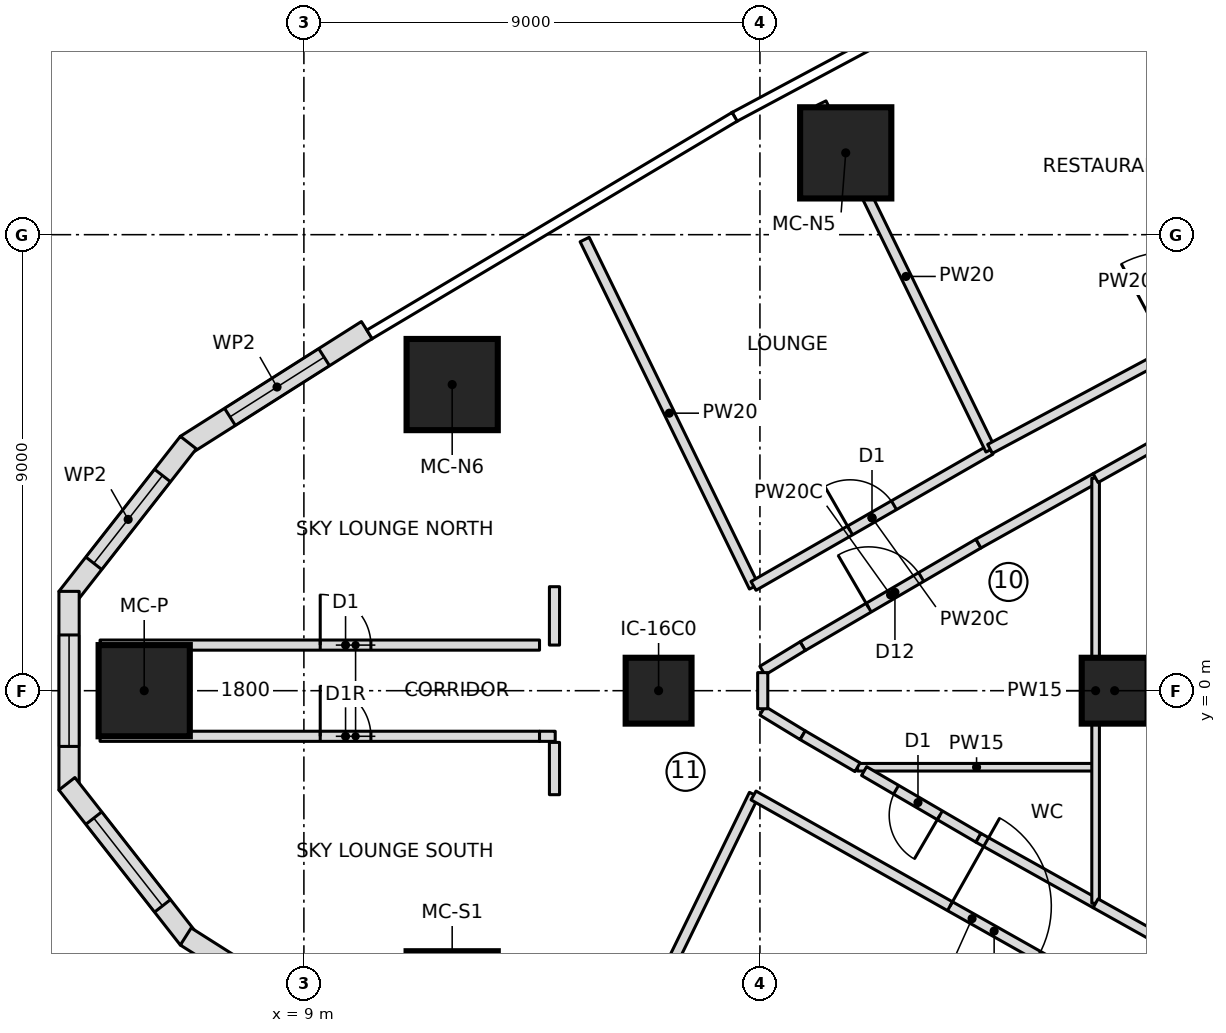
"""IFC4 building model, lengths in metres.
Left out: names, types, materials, properties, quantities, classifications, styles, units other than length and angle.
Written with IfcOpenShell. Run it as: python <this file> out.ifc"""

import sys

from ifc_helpers import new_model, si_unit, direction, frame, frame_2d, origin, origin_2d, place, context, subcontext, project, spatial, polyline, rectangle, outline, extrude, element, fill, save


model = new_model("IFC4")
c1 = context("Model", 3, precision=1e-05, world=origin(), true_north=direction((0.0, 1.0)))
c2 = subcontext(c1, "Body", "Model", "MODEL_VIEW")
j1 = project(units=[si_unit("LENGTHUNIT", "METRE"), si_unit("PLANEANGLEUNIT", "RADIAN")], contexts=[c1])
p1 = place(None, origin())
s1 = spatial("IfcSite", under=j1, at=p1, CompositionType="ELEMENT")
p2 = place(p1, origin())
s2 = spatial("IfcBuilding", under=s1, at=p2, CompositionType="ELEMENT")
p3 = place(p2, frame((0.0, 0.0, 35.0)))
s3 = spatial("IfcBuildingStorey", under=s2, at=p3, CompositionType="ELEMENT", Elevation=35.0)
for number, where, z_axis, x_axis in (
    (1, (5.848, 0.0, 0.0), (0.0, 0.0, 1.0), (1.0, 0.0, 0.0)),
    (2, (11.927, -6.042, 0.0), (0.0, 0.0, 1.0), (1.0, 0.0, 0.0)),
    (3, (19.693, 10.615, 0.0), (0.0, 0.0, 1.0), (1.0, 0.0, 0.0)),
    (4, (11.927, 6.042, 0.0), (0.0, 0.0, 1.0), (1.0, 0.0, 0.0)),
):
    element("IfcColumn", number, at=place(p3, frame(where, z_axis=z_axis, x_axis=x_axis)), inside=s3, PredefinedType="COLUMN", context=c2, shape_type="SweptSolid", body=[
        extrude(rectangle(XDim=1.8, YDim=1.8, at=origin_2d()), origin(), (0.0, 0.0, 1.0), 4.6),
    ])
for number, where, z_axis, x_axis in (
    (5, (16.0, 0.0, 0.0), (0.0, 0.0, 1.0), (1.0, 0.0, 0.0)),
    (6, (25.0, 0.0, 0.0), (0.0, 0.0, 1.0), (1.0, 0.0, 0.0)),
):
    element("IfcColumn", number, at=place(p3, frame(where, z_axis=z_axis, x_axis=x_axis)), inside=s3, PredefinedType="COLUMN", context=c2, shape_type="SweptSolid", body=[
        extrude(rectangle(XDim=1.3, YDim=1.3, at=origin_2d()), origin(), (0.0, 0.0, 1.0), 4.6),
    ])
p4 = place(p3, frame((10.242, 7.116, 0.0), z_axis=(0.0, 0.0, 1.0), x_axis=(-0.844551578623, -0.535474211372, 0.0)))
e7 = element("IfcWall", 7, at=p4, inside=s3, PredefinedType="NOTDEFINED", context=c2, shape_type="SweptSolid", body=[
    extrude(outline(polyline([(0.0, -0.2), (4.23, -0.2), (4.162, 0.2), (0.0, 0.2), (0.0, -0.2)])), origin(), (0.0, 0.0, 1.0), 4.3),
])
p5 = place(p4, frame((0.998, 0.0, 0.6)))
e8 = element("IfcOpeningElement", 8, at=p5, cuts=e7, PredefinedType="OPENING", context=c2, shape_type="SweptSolid", body=[
    extrude(outline(polyline([(0.0, 1.35), (0.084, 1.771), (0.322, 2.128), (0.679, 2.366), (1.1, 2.45), (1.521, 2.366), (1.878, 2.128), (2.116, 1.771), (2.2, 1.35), (2.2, 1.1), (2.116, 0.679), (1.878, 0.322), (1.521, 0.084), (1.1, 0.0), (0.679, 0.084), (0.322, 0.322), (0.084, 0.679), (0.0, 1.1), (0.0, 1.35)])), frame((0.0, 0.21, 0.0), z_axis=(0.0, -1.0, 0.0), x_axis=(1.0, 0.0, 0.0)), (0.0, 0.0, 1.0), 0.42),
])
p6 = place(p3, frame((6.698, 4.87, 0.0), z_axis=(0.0, 0.0, 1.0), x_axis=(-0.616586647779, -0.787287054245, 0.0)))
e9 = element("IfcWall", 9, at=p6, inside=s3, PredefinedType="NOTDEFINED", context=c2, shape_type="SweptSolid", body=[
    extrude(outline(polyline([(-0.034, -0.2), (3.852, -0.2), (3.714, 0.2), (0.034, 0.2), (-0.034, -0.2)])), origin(), (0.0, 0.0, 1.0), 4.3),
])
p7 = place(p6, frame((0.792, 0.0, 0.6)))
e10 = element("IfcOpeningElement", 10, at=p7, cuts=e9, PredefinedType="OPENING", context=c2, shape_type="SweptSolid", body=[
    extrude(outline(polyline([(0.0, 1.35), (0.084, 1.771), (0.322, 2.128), (0.679, 2.366), (1.1, 2.45), (1.521, 2.366), (1.878, 2.128), (2.116, 1.771), (2.2, 1.35), (2.2, 1.1), (2.116, 0.679), (1.878, 0.322), (1.521, 0.084), (1.1, 0.0), (0.679, 0.084), (0.322, 0.322), (0.084, 0.679), (0.0, 1.1), (0.0, 1.35)])), frame((0.0, 0.21, 0.0), z_axis=(0.0, -1.0, 0.0), x_axis=(1.0, 0.0, 0.0)), (0.0, 0.0, 1.0), 0.42),
])
p8 = place(p3, frame((4.365, 1.891, 0.0), z_axis=(0.0, 0.0, 1.0), x_axis=(0.0, -1.0, 0.0)))
e11 = element("IfcWall", 11, at=p8, inside=s3, PredefinedType="NOTDEFINED", context=c2, shape_type="SweptSolid", body=[
    extrude(outline(polyline([(-0.069, -0.2), (3.852, -0.2), (3.714, 0.2), (0.069, 0.2), (-0.069, -0.2)])), origin(), (0.0, 0.0, 1.0), 4.3),
])
p9 = place(p8, frame((0.792, 0.0, 0.6)))
e12 = element("IfcOpeningElement", 12, at=p9, cuts=e11, PredefinedType="OPENING", context=c2, shape_type="SweptSolid", body=[
    extrude(outline(polyline([(0.0, 1.35), (0.084, 1.771), (0.322, 2.128), (0.679, 2.366), (1.1, 2.45), (1.521, 2.366), (1.878, 2.128), (2.116, 1.771), (2.2, 1.35), (2.2, 1.1), (2.116, 0.679), (1.878, 0.322), (1.521, 0.084), (1.1, 0.0), (0.679, 0.084), (0.322, 0.322), (0.084, 0.679), (0.0, 1.1), (0.0, 1.35)])), frame((0.0, 0.21, 0.0), z_axis=(0.0, -1.0, 0.0), x_axis=(1.0, 0.0, 0.0)), (0.0, 0.0, 1.0), 0.42),
])
p10 = place(p3, frame((4.365, -1.891, 0.0), z_axis=(0.0, 0.0, 1.0), x_axis=(0.616586647779, -0.787287054245, 0.0)))
e13 = element("IfcWall", 13, at=p10, inside=s3, PredefinedType="NOTDEFINED", context=c2, shape_type="SweptSolid", body=[
    extrude(outline(polyline([(-0.069, -0.2), (3.817, -0.2), (3.749, 0.2), (0.069, 0.2), (-0.069, -0.2)])), origin(), (0.0, 0.0, 1.0), 4.3),
])
p11 = place(p10, frame((0.792, 0.0, 0.6)))
e14 = element("IfcOpeningElement", 14, at=p11, cuts=e13, PredefinedType="OPENING", context=c2, shape_type="SweptSolid", body=[
    extrude(outline(polyline([(0.0, 1.35), (0.084, 1.771), (0.322, 2.128), (0.679, 2.366), (1.1, 2.45), (1.521, 2.366), (1.878, 2.128), (2.116, 1.771), (2.2, 1.35), (2.2, 1.1), (2.116, 0.679), (1.878, 0.322), (1.521, 0.084), (1.1, 0.0), (0.679, 0.084), (0.322, 0.322), (0.084, 0.679), (0.0, 1.1), (0.0, 1.35)])), frame((0.0, 0.21, 0.0), z_axis=(0.0, -1.0, 0.0), x_axis=(1.0, 0.0, 0.0)), (0.0, 0.0, 1.0), 0.42),
])
p12 = place(p3, frame((6.698, -4.87, 0.0), z_axis=(0.0, 0.0, 1.0), x_axis=(0.844551578623, -0.535474211372, 0.0)))
e15 = element("IfcWall", 15, at=p12, inside=s3, PredefinedType="NOTDEFINED", context=c2, shape_type="SweptSolid", body=[
    extrude(outline(polyline([(-0.034, -0.2), (4.196, -0.2), (4.196, 0.2), (0.034, 0.2), (-0.034, -0.2)])), origin(), (0.0, 0.0, 1.0), 4.3),
])
p13 = place(p12, frame((0.998, 0.0, 0.6)))
e16 = element("IfcOpeningElement", 16, at=p13, cuts=e15, PredefinedType="OPENING", context=c2, shape_type="SweptSolid", body=[
    extrude(outline(polyline([(0.0, 1.35), (0.084, 1.771), (0.322, 2.128), (0.679, 2.366), (1.1, 2.45), (1.521, 2.366), (1.878, 2.128), (2.116, 1.771), (2.2, 1.35), (2.2, 1.1), (2.116, 0.679), (1.878, 0.322), (1.521, 0.084), (1.1, 0.0), (0.679, 0.084), (0.322, 0.322), (0.084, 0.679), (0.0, 1.1), (0.0, 1.35)])), frame((0.0, 0.21, 0.0), z_axis=(0.0, -1.0, 0.0), x_axis=(1.0, 0.0, 0.0)), (0.0, 0.0, 1.0), 0.42),
])
p14 = place(p3, frame((17.882, 2.05, 0.0), z_axis=(0.0, 0.0, 1.0), x_axis=(-0.438213564788, 0.898870887078, 0.0)))
e17 = element("IfcWall", 17, at=p14, inside=s3, PredefinedType="PARTITIONING", context=c2, shape_type="SweptSolid", body=[
    extrude(rectangle(XDim=7.625, YDim=0.2, at=frame_2d((3.813, 0.0))), origin(), (0.0, 0.0, 1.0), 4.3),
])
p15 = place(p3, frame((17.874, 2.068, 0.0), z_axis=(0.0, 0.0, 1.0), x_axis=(0.867093061484, 0.4981461861, 0.0)))
e18 = element("IfcWall", 18, at=p15, inside=s3, PredefinedType="PARTITIONING", context=c2, shape_type="SweptSolid", body=[
    extrude(rectangle(XDim=5.393, YDim=0.2, at=frame_2d((2.697, 0.0))), origin(), (0.0, 0.0, 1.0), 4.3),
])
p16 = place(p15, frame((2.197, 0.0, 0.0)))
e19 = element("IfcOpeningElement", 19, at=p16, cuts=e18, PredefinedType="OPENING", context=c2, shape_type="SweptSolid", body=[
    extrude(rectangle(XDim=1.0, YDim=2.1, at=frame_2d((0.5, 1.05))), frame((0.0, 0.11, 0.0), z_axis=(0.0, -1.0, 0.0), x_axis=(1.0, 0.0, 0.0)), (0.0, 0.0, 1.0), 0.22),
])
p17 = place(p3, frame((22.55, 4.755, 0.0), z_axis=(0.0, 0.0, 1.0), x_axis=(-0.438210669268, 0.898872298683, 0.0)))
e20 = element("IfcWall", 20, at=p17, inside=s3, PredefinedType="PARTITIONING", context=c2, shape_type="SweptSolid", body=[
    extrude(rectangle(XDim=7.612, YDim=0.2, at=frame_2d((3.806, 0.0))), origin(), (0.0, 0.0, 1.0), 4.3),
])
p18 = place(p3, frame((22.541, 4.773, 0.0), z_axis=(0.0, 0.0, 1.0), x_axis=(0.881864282024, 0.471503327762, 0.0)))
e21 = element("IfcWall", 21, at=p18, inside=s3, PredefinedType="PARTITIONING", context=c2, shape_type="SweptSolid", body=[
    extrude(rectangle(XDim=9.012, YDim=0.2, at=frame_2d((4.506, 0.0))), origin(), (0.0, 0.0, 1.0), 4.3),
])
p19 = place(p18, frame((4.006, 0.0, 0.0)))
e22 = element("IfcOpeningElement", 22, at=p19, cuts=e21, PredefinedType="OPENING", context=c2, shape_type="SweptSolid", body=[
    extrude(rectangle(XDim=2.0, YDim=2.4, at=frame_2d((1.0, 1.2))), frame((0.0, 0.11, 0.0), z_axis=(0.0, -1.0, 0.0), x_axis=(1.0, 0.0, 0.0)), (0.0, 0.0, 1.0), 0.22),
])
p20 = place(p3, frame((14.541, -8.904, 0.0), z_axis=(0.0, 0.0, 1.0), x_axis=(0.438213564788, 0.898870887078, 0.0)))
e23 = element("IfcWall", 23, at=p20, inside=s3, PredefinedType="PARTITIONING", context=c2, shape_type="SweptSolid", body=[
    extrude(rectangle(XDim=7.625, YDim=0.2, at=frame_2d((3.813, 0.0))), origin(), (0.0, 0.0, 1.0), 4.3),
])
p21 = place(p3, frame((17.874, -2.068, 0.0), z_axis=(0.0, 0.0, 1.0), x_axis=(0.871165632804, -0.490989246544, 0.0)))
e24 = element("IfcWall", 24, at=p21, inside=s3, PredefinedType="PARTITIONING", context=c2, shape_type="SweptSolid", body=[
    extrude(rectangle(XDim=9.901, YDim=0.2, at=frame_2d((4.951, 0.0))), origin(), (0.0, 0.0, 1.0), 4.3),
])
p22 = place(p21, frame((4.451, 0.0, 0.0)))
e25 = element("IfcOpeningElement", 25, at=p22, cuts=e24, PredefinedType="OPENING", context=c2, shape_type="SweptSolid", body=[
    extrude(rectangle(XDim=2.0, YDim=2.4, at=frame_2d((1.0, 1.2))), frame((0.0, 0.11, 0.0), z_axis=(0.0, -1.0, 0.0), x_axis=(1.0, 0.0, 0.0)), (0.0, 0.0, 1.0), 0.22),
])
p23 = place(p3, frame((19.926, -1.51, 0.0), z_axis=(0.0, 0.0, 1.0), x_axis=(1.0, 0.0, 0.0)))
e26 = element("IfcWall", 26, at=p23, inside=s3, PredefinedType="PARTITIONING", context=c2, shape_type="SweptSolid", body=[
    extrude(rectangle(XDim=4.699, YDim=0.15, at=frame_2d((2.349, 0.0))), origin(), (0.0, 0.0, 1.0), 4.3),
])
p24 = place(p3, frame((22.312, -2.903, 0.0), z_axis=(0.0, 0.0, 1.0), x_axis=(-0.863687380961, 0.504027884118, 0.0)))
e27 = element("IfcWall", 27, at=p24, inside=s3, PredefinedType="PARTITIONING", context=c2, shape_type="SweptSolid", body=[
    extrude(rectangle(XDim=2.613, YDim=0.2, at=frame_2d((1.306, 0.0))), origin(), (0.0, 0.0, 1.0), 4.3),
])
p25 = place(p24, frame((0.881, 0.0, 0.0)))
e28 = element("IfcOpeningElement", 28, at=p25, cuts=e27, PredefinedType="OPENING", context=c2, shape_type="SweptSolid", body=[
    extrude(rectangle(XDim=1.0, YDim=2.1, at=frame_2d((0.5, 1.05))), frame((0.0, 0.11, 0.0), z_axis=(0.0, -1.0, 0.0), x_axis=(1.0, 0.0, 0.0)), (0.0, 0.0, 1.0), 0.22),
])
p26 = place(p3, frame((24.625, -4.196, 0.0), z_axis=(0.0, 0.0, 1.0), x_axis=(-0.87283266248, 0.48801961365, 0.0)))
e29 = element("IfcWall", 29, at=p26, inside=s3, PredefinedType="PARTITIONING", context=c2, shape_type="SweptSolid", body=[
    extrude(rectangle(XDim=2.649, YDim=0.2, at=frame_2d((1.325, 0.0))), origin(), (0.0, 0.0, 1.0), 4.3),
])
p27 = place(p3, frame((18.844, 0.879, 0.0), z_axis=(0.0, 0.0, 1.0), x_axis=(0.863710538269, 0.503988200341, 0.0)))
e30 = element("IfcWall", 30, at=p27, inside=s3, PredefinedType="PARTITIONING", context=c2, shape_type="SweptSolid", body=[
    extrude(rectangle(XDim=4.016, YDim=0.2, at=frame_2d((2.008, 0.0))), origin(), (0.0, 0.0, 1.0), 4.3),
])
p28 = place(p27, frame((1.508, 0.0, 0.0)))
e31 = element("IfcOpeningElement", 31, at=p28, cuts=e30, PredefinedType="OPENING", context=c2, shape_type="SweptSolid", body=[
    extrude(rectangle(XDim=1.2, YDim=2.1, at=frame_2d((0.6, 1.05))), frame((0.0, 0.11, 0.0), z_axis=(0.0, -1.0, 0.0), x_axis=(1.0, 0.0, 0.0)), (0.0, 0.0, 1.0), 0.22),
])
for number, where, z_axis, x_axis in (
    (32, (18.844, -0.879, 0.0), (0.0, 0.0, 1.0), (-0.854, 0.52, 0.0)),
    (33, (18.05, 0.396, 0.0), (0.0, 0.0, 1.0), (0.854, 0.52, 0.0)),
):
    element("IfcWall", number, at=place(p3, frame(where, z_axis=z_axis, x_axis=x_axis)), inside=s3, PredefinedType="PARTITIONING", context=c2, shape_type="SweptSolid", body=[
        extrude(rectangle(XDim=0.929, YDim=0.2, at=frame_2d((0.464, 0.0))), origin(), (0.0, 0.0, 1.0), 4.3),
    ])
p29 = place(p3, frame((22.312, 2.903, 0.0), z_axis=(0.0, 0.0, 1.0), x_axis=(0.87283266248, 0.48801961365, 0.0)))
e34 = element("IfcWall", 34, at=p29, inside=s3, PredefinedType="PARTITIONING", context=c2, shape_type="SweptSolid", body=[
    extrude(rectangle(XDim=2.649, YDim=0.2, at=frame_2d((1.325, 0.0))), origin(), (0.0, 0.0, 1.0), 4.3),
])
p30 = place(p3, frame((19.926, -1.51, 0.0), z_axis=(0.0, 0.0, 1.0), x_axis=(-0.8637718337, 0.503883140525, 0.0)))
e35 = element("IfcWall", 35, at=p30, inside=s3, PredefinedType="PARTITIONING", context=c2, shape_type="SweptSolid", body=[
    extrude(rectangle(XDim=1.253, YDim=0.2, at=frame_2d((0.626, 0.0))), origin(), (0.0, 0.0, 1.0), 4.3),
])
p31 = place(p3, frame((24.625, -4.196, 0.0), z_axis=(0.0, 0.0, 1.0), x_axis=(0.0, 1.0, 0.0)))
e36 = element("IfcWall", 36, at=p31, inside=s3, PredefinedType="PARTITIONING", context=c2, shape_type="SweptSolid", body=[
    extrude(rectangle(XDim=8.392, YDim=0.15, at=frame_2d((4.196, 0.0))), origin(), (0.0, 0.0, 1.0), 4.3),
])
for number, where, z_axis, x_axis in (
    (37, (25.817, -4.863, 0.0), (0.0, 0.0, 1.0), (-0.873, 0.488, 0.0)),
    (38, (24.625, 4.196, 0.0), (0.0, 0.0, 1.0), (0.873, 0.488, 0.0)),
):
    element("IfcWall", number, at=place(p3, frame(where, z_axis=z_axis, x_axis=x_axis)), inside=s3, PredefinedType="PARTITIONING", context=c2, shape_type="SweptSolid", body=[
        extrude(rectangle(XDim=1.366, YDim=0.2, at=frame_2d((0.683, 0.0))), origin(), (0.0, 0.0, 1.0), 4.3),
    ])
p32 = place(p3, frame((4.977, 0.9, 0.0), z_axis=(0.0, 0.0, 1.0), x_axis=(1.0, 0.0, 0.0)))
e39 = element("IfcWall", 39, at=p32, inside=s3, PredefinedType="PARTITIONING", context=c2, shape_type="SweptSolid", body=[
    extrude(rectangle(XDim=8.673, YDim=0.2, at=frame_2d((4.336, 0.0))), origin(), (0.0, 0.0, 1.0), 4.3),
])
p33 = place(p32, frame((4.345, 0.0, 0.0)))
e40 = element("IfcOpeningElement", 40, at=p33, cuts=e39, PredefinedType="OPENING", context=c2, shape_type="SweptSolid", body=[
    extrude(rectangle(XDim=1.0, YDim=2.1, at=frame_2d((0.5, 1.05))), frame((0.0, 0.11, 0.0), z_axis=(0.0, -1.0, 0.0), x_axis=(1.0, 0.0, 0.0)), (0.0, 0.0, 1.0), 0.22),
])
p34 = place(p3, frame((4.977, -0.9, 0.0), z_axis=(0.0, 0.0, 1.0), x_axis=(1.0, 0.0, 0.0)))
e41 = element("IfcWall", 41, at=p34, inside=s3, PredefinedType="PARTITIONING", context=c2, shape_type="SweptSolid", body=[
    extrude(rectangle(XDim=8.673, YDim=0.2, at=frame_2d((4.336, 0.0))), origin(), (0.0, 0.0, 1.0), 4.3),
])
p35 = place(p34, frame((4.345, 0.0, 0.0)))
e42 = element("IfcOpeningElement", 42, at=p35, cuts=e41, PredefinedType="OPENING", context=c2, shape_type="SweptSolid", body=[
    extrude(rectangle(XDim=1.0, YDim=2.1, at=frame_2d((0.5, 1.05))), frame((0.0, 0.11, 0.0), z_axis=(0.0, -1.0, 0.0), x_axis=(1.0, 0.0, 0.0)), (0.0, 0.0, 1.0), 0.22),
])
p36 = place(p3, frame((18.055, -0.357, 0.0), z_axis=(0.0, 0.0, 1.0), x_axis=(0.0, 1.0, 0.0)))
e43 = element("IfcWall", 43, at=p36, inside=s3, PredefinedType="PARTITIONING", context=c2, shape_type="SweptSolid", body=[
    extrude(rectangle(XDim=0.713, YDim=0.2, at=frame_2d((0.357, 0.0))), origin(), (0.0, 0.0, 1.0), 4.3),
])
p37 = place(p3, frame((13.946, 2.052, 0.0), z_axis=(0.0, 0.0, 1.0), x_axis=(-0.000423818568, -0.999999910189, 0.0)))
e44 = element("IfcWall", 44, at=p37, inside=s3, PredefinedType="PARTITIONING", context=c2, shape_type="SweptSolid", body=[
    extrude(rectangle(XDim=1.152, YDim=0.2, at=frame_2d((0.576, 0.0))), origin(), (0.0, 0.0, 1.0), 4.3),
])
p38 = place(p3, frame((13.65, -0.9, 0.0), z_axis=(0.0, 0.0, 1.0), x_axis=(0.99999876, -0.001574801197, 0.0)))
e45 = element("IfcWall", 45, at=p38, inside=s3, PredefinedType="PARTITIONING", context=c2, shape_type="SweptSolid", body=[
    extrude(rectangle(XDim=0.31, YDim=0.2, at=frame_2d((0.155, 0.0))), origin(), (0.0, 0.0, 1.0), 4.3),
])
p39 = place(p3, frame((13.945, -1.021, 0.0), z_axis=(0.0, 0.0, 1.0), x_axis=(0.000473148752, -0.999999888065, 0.0)))
e46 = element("IfcWall", 46, at=p39, inside=s3, PredefinedType="PARTITIONING", context=c2, shape_type="SweptSolid", body=[
    extrude(rectangle(XDim=1.032, YDim=0.2, at=frame_2d((0.516, 0.0))), origin(), (0.0, 0.0, 1.0), 4.3),
])
p40 = place(p5, origin())
e47 = element("IfcWindow", 47, at=p40, inside=s3, PartitioningType="SINGLE_PANEL", PredefinedType="WINDOW", context=c2, shape_type="SweptSolid", body=[
    extrude(outline(polyline([(0.0, 1.35), (0.084, 1.771), (0.322, 2.128), (0.679, 2.366), (1.1, 2.45), (1.521, 2.366), (1.878, 2.128), (2.116, 1.771), (2.2, 1.35), (2.2, 1.1), (2.116, 0.679), (1.878, 0.322), (1.521, 0.084), (1.1, 0.0), (0.679, 0.084), (0.322, 0.322), (0.084, 0.679), (0.0, 1.1), (0.0, 1.35)])), frame((0.0, 0.17, 0.0), z_axis=(0.0, -1.0, 0.0), x_axis=(1.0, 0.0, 0.0)), (0.0, 0.0, 1.0), 0.06),
])
fill(e8, e47)
p41 = place(p7, origin())
e48 = element("IfcWindow", 48, at=p41, inside=s3, PartitioningType="SINGLE_PANEL", PredefinedType="WINDOW", context=c2, shape_type="SweptSolid", body=[
    extrude(outline(polyline([(0.0, 1.35), (0.084, 1.771), (0.322, 2.128), (0.679, 2.366), (1.1, 2.45), (1.521, 2.366), (1.878, 2.128), (2.116, 1.771), (2.2, 1.35), (2.2, 1.1), (2.116, 0.679), (1.878, 0.322), (1.521, 0.084), (1.1, 0.0), (0.679, 0.084), (0.322, 0.322), (0.084, 0.679), (0.0, 1.1), (0.0, 1.35)])), frame((0.0, 0.17, 0.0), z_axis=(0.0, -1.0, 0.0), x_axis=(1.0, 0.0, 0.0)), (0.0, 0.0, 1.0), 0.06),
])
fill(e10, e48)
p42 = place(p9, origin())
e49 = element("IfcWindow", 49, at=p42, inside=s3, PartitioningType="SINGLE_PANEL", PredefinedType="WINDOW", context=c2, shape_type="SweptSolid", body=[
    extrude(outline(polyline([(0.0, 1.35), (0.084, 1.771), (0.322, 2.128), (0.679, 2.366), (1.1, 2.45), (1.521, 2.366), (1.878, 2.128), (2.116, 1.771), (2.2, 1.35), (2.2, 1.1), (2.116, 0.679), (1.878, 0.322), (1.521, 0.084), (1.1, 0.0), (0.679, 0.084), (0.322, 0.322), (0.084, 0.679), (0.0, 1.1), (0.0, 1.35)])), frame((0.0, 0.17, 0.0), z_axis=(0.0, -1.0, 0.0), x_axis=(1.0, 0.0, 0.0)), (0.0, 0.0, 1.0), 0.06),
])
fill(e12, e49)
p43 = place(p11, origin())
e50 = element("IfcWindow", 50, at=p43, inside=s3, PartitioningType="SINGLE_PANEL", PredefinedType="WINDOW", context=c2, shape_type="SweptSolid", body=[
    extrude(outline(polyline([(0.0, 1.35), (0.084, 1.771), (0.322, 2.128), (0.679, 2.366), (1.1, 2.45), (1.521, 2.366), (1.878, 2.128), (2.116, 1.771), (2.2, 1.35), (2.2, 1.1), (2.116, 0.679), (1.878, 0.322), (1.521, 0.084), (1.1, 0.0), (0.679, 0.084), (0.322, 0.322), (0.084, 0.679), (0.0, 1.1), (0.0, 1.35)])), frame((0.0, 0.17, 0.0), z_axis=(0.0, -1.0, 0.0), x_axis=(1.0, 0.0, 0.0)), (0.0, 0.0, 1.0), 0.06),
])
fill(e14, e50)
p44 = place(p33, origin())
e51 = element("IfcDoor", 51, at=p44, inside=s3, OperationType="SINGLE_SWING_LEFT", PredefinedType="DOOR", context=c2, shape_type="SweptSolid", body=[
    extrude(rectangle(XDim=1.0, YDim=2.1, at=frame_2d((0.5, 1.05))), frame((0.0, 0.025, 0.0), z_axis=(0.0, -1.0, 0.0), x_axis=(1.0, 0.0, 0.0)), (0.0, 0.0, 1.0), 0.05),
])
fill(e40, e51)
p45 = place(p35, origin())
e52 = element("IfcDoor", 52, at=p45, inside=s3, OperationType="SINGLE_SWING_RIGHT", PredefinedType="DOOR", context=c2, shape_type="SweptSolid", body=[
    extrude(rectangle(XDim=1.0, YDim=2.1, at=frame_2d((0.5, 1.05))), frame((0.0, 0.025, 0.0), z_axis=(0.0, -1.0, 0.0), x_axis=(1.0, 0.0, 0.0)), (0.0, 0.0, 1.0), 0.05),
])
fill(e42, e52)
p46 = place(p16, origin())
e53 = element("IfcDoor", 53, at=p46, inside=s3, OperationType="SINGLE_SWING_LEFT", PredefinedType="DOOR", context=c2, shape_type="SweptSolid", body=[
    extrude(rectangle(XDim=1.0, YDim=2.1, at=frame_2d((0.5, 1.05))), frame((0.0, 0.025, 0.0), z_axis=(0.0, -1.0, 0.0), x_axis=(1.0, 0.0, 0.0)), (0.0, 0.0, 1.0), 0.05),
])
fill(e19, e53)
p47 = place(p22, origin())
e54 = element("IfcDoor", 54, at=p47, inside=s3, OperationType="DOUBLE_DOOR_SINGLE_SWING", PredefinedType="DOOR", context=c2, shape_type="SweptSolid", body=[
    extrude(rectangle(XDim=2.0, YDim=2.4, at=frame_2d((1.0, 1.2))), frame((0.0, 0.025, 0.0), z_axis=(0.0, -1.0, 0.0), x_axis=(1.0, 0.0, 0.0)), (0.0, 0.0, 1.0), 0.05),
])
fill(e25, e54)
p48 = place(p25, origin())
e55 = element("IfcDoor", 55, at=p48, inside=s3, OperationType="SINGLE_SWING_LEFT", PredefinedType="DOOR", context=c2, shape_type="SweptSolid", body=[
    extrude(rectangle(XDim=1.0, YDim=2.1, at=frame_2d((0.5, 1.05))), frame((0.0, 0.025, 0.0), z_axis=(0.0, -1.0, 0.0), x_axis=(1.0, 0.0, 0.0)), (0.0, 0.0, 1.0), 0.05),
])
fill(e28, e55)
p49 = place(p28, origin())
e56 = element("IfcDoor", 56, at=p49, inside=s3, OperationType="SINGLE_SWING_RIGHT", PredefinedType="DOOR", context=c2, shape_type="SweptSolid", body=[
    extrude(rectangle(XDim=1.2, YDim=2.1, at=frame_2d((0.6, 1.05))), frame((0.0, 0.025, 0.0), z_axis=(0.0, -1.0, 0.0), x_axis=(1.0, 0.0, 0.0)), (0.0, 0.0, 1.0), 0.05),
])
fill(e31, e56)
save(model, sys.argv[1])
